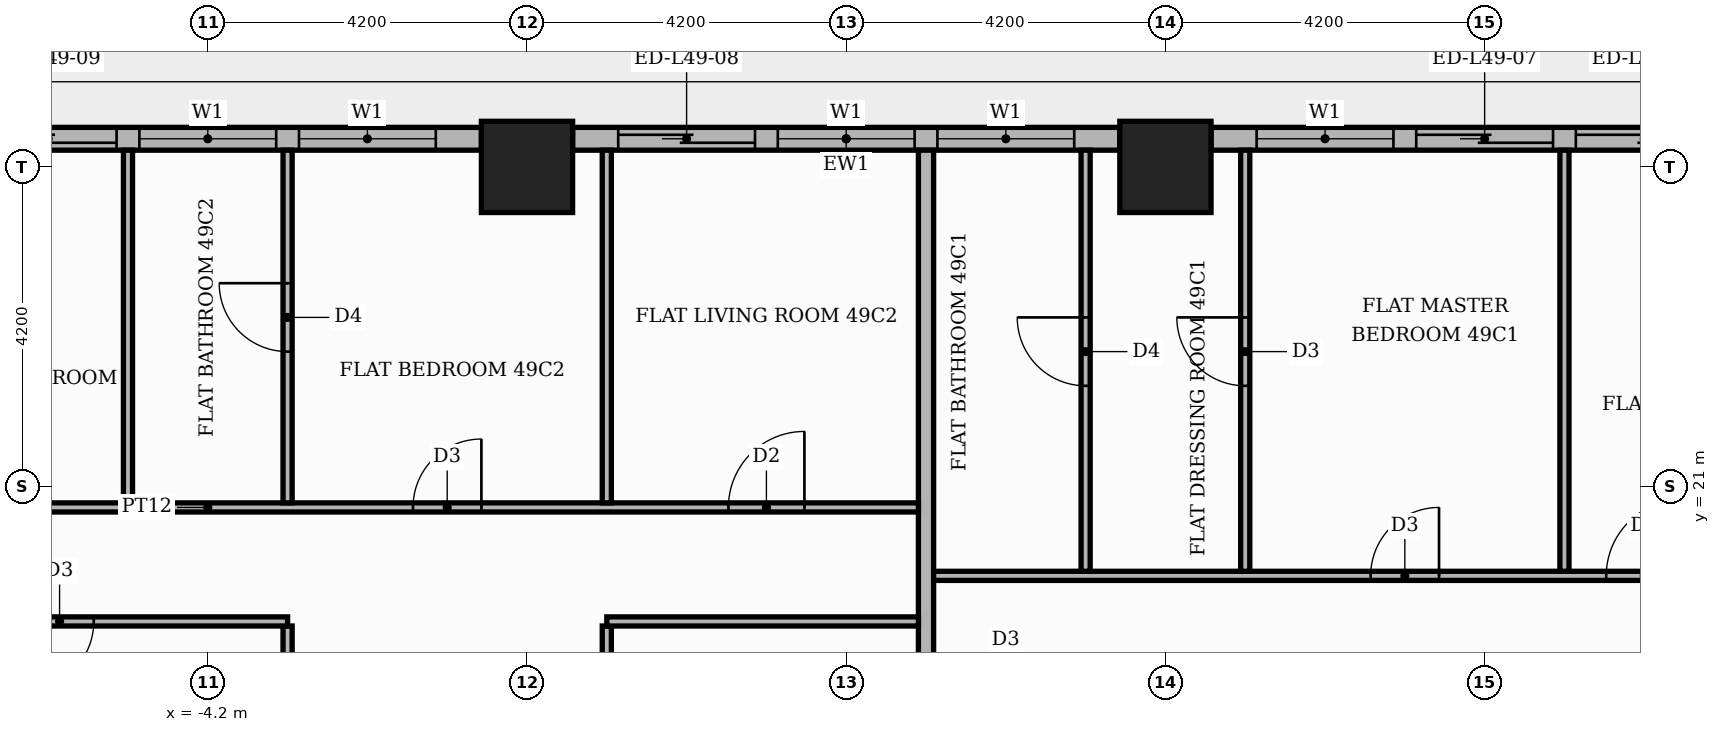
"""IFC4 building model, lengths in metres.
Left out: names, types, materials, properties, quantities, classifications, styles, units other than length and angle.
Written with IfcOpenShell. Run it as: python <this file> out.ifc"""

import sys

from ifc_helpers import new_model, si_unit, direction, frame, frame_2d, origin, origin_2d, place, context, subcontext, project, spatial, rectangle, extrude, element, fill, save


model = new_model("IFC4")
c1 = context("Model", 3, precision=1e-05, world=origin(), true_north=direction((0.0, 1.0)))
c2 = subcontext(c1, "Body", "Model", "MODEL_VIEW")
j1 = project(units=[si_unit("LENGTHUNIT", "METRE"), si_unit("PLANEANGLEUNIT", "RADIAN")], contexts=[c1])
p1 = place(None, origin())
s1 = spatial("IfcSite", under=j1, at=p1, CompositionType="ELEMENT")
p2 = place(p1, origin())
s2 = spatial("IfcBuilding", under=s1, at=p2, CompositionType="ELEMENT")
p3 = place(p2, frame((0.0, 0.0, 207.9)))
s3 = spatial("IfcBuildingStorey", under=s2, at=p3, CompositionType="ELEMENT", Elevation=207.9)
for number, where, z_axis, x_axis in (
    (1, (0.0, 25.2, 0.0), (0.0, 0.0, 1.0), (1.0, 0.0, 0.0)),
    (2, (8.4, 25.2, 0.0), (0.0, 0.0, 1.0), (1.0, 0.0, 0.0)),
):
    element("IfcColumn", number, at=place(p3, frame(where, z_axis=z_axis, x_axis=x_axis)), inside=s3, PredefinedType="COLUMN", context=c2, shape_type="SweptSolid", body=[
        extrude(rectangle(XDim=1.2, YDim=1.2, at=origin_2d()), origin(), (0.0, 0.0, 1.0), 3.9),
    ])
p4 = place(p3, frame((16.2, 25.57, 0.0), z_axis=(0.0, 0.0, 1.0), x_axis=(-1.0, 0.0, 0.0)))
e3 = element("IfcWall", 3, at=p4, inside=s3, PredefinedType="STANDARD", context=c2, shape_type="SweptSolid", body=[
    extrude(rectangle(XDim=7.2, YDim=0.3, at=frame_2d((3.6, 0.0))), origin(), (0.0, 0.0, 1.0), 3.48),
])
p5 = place(p4, frame((0.6, 0.0, 0.0)))
e4 = element("IfcOpeningElement", 4, at=p5, cuts=e3, PredefinedType="OPENING", context=c2, shape_type="SweptSolid", body=[
    extrude(rectangle(XDim=1.8, YDim=2.4, at=frame_2d((0.9, 1.2))), frame((0.0, 0.16, 0.0), z_axis=(0.0, -1.0, 0.0), x_axis=(1.0, 0.0, 0.0)), (0.0, 0.0, 1.0), 0.32),
])
p6 = place(p4, frame((2.7, 0.0, 0.0)))
e5 = element("IfcOpeningElement", 5, at=p6, cuts=e3, PredefinedType="OPENING", context=c2, shape_type="SweptSolid", body=[
    extrude(rectangle(XDim=1.8, YDim=2.4, at=frame_2d((0.9, 1.2))), frame((0.0, 0.16, 0.0), z_axis=(0.0, -1.0, 0.0), x_axis=(1.0, 0.0, 0.0)), (0.0, 0.0, 1.0), 0.32),
])
p7 = place(p4, frame((4.8, 0.0, 0.9)))
e6 = element("IfcOpeningElement", 6, at=p7, cuts=e3, PredefinedType="OPENING", context=c2, shape_type="SweptSolid", body=[
    extrude(rectangle(XDim=1.8, YDim=2.1, at=frame_2d((0.9, 1.05))), frame((0.0, 0.16, 0.0), z_axis=(0.0, -1.0, 0.0), x_axis=(1.0, 0.0, 0.0)), (0.0, 0.0, 1.0), 0.32),
])
p8 = place(p3, frame((7.8, 25.57, 0.0), z_axis=(0.0, 0.0, 1.0), x_axis=(-1.0, 0.0, 0.0)))
e7 = element("IfcWall", 7, at=p8, inside=s3, PredefinedType="STANDARD", context=c2, shape_type="SweptSolid", body=[
    extrude(rectangle(XDim=7.2, YDim=0.3, at=frame_2d((3.6, 0.0))), origin(), (0.0, 0.0, 1.0), 3.48),
])
p9 = place(p8, frame((0.6, 0.0, 0.9)))
e8 = element("IfcOpeningElement", 8, at=p9, cuts=e7, PredefinedType="OPENING", context=c2, shape_type="SweptSolid", body=[
    extrude(rectangle(XDim=1.8, YDim=2.1, at=frame_2d((0.9, 1.05))), frame((0.0, 0.16, 0.0), z_axis=(0.0, -1.0, 0.0), x_axis=(1.0, 0.0, 0.0)), (0.0, 0.0, 1.0), 0.32),
])
p10 = place(p8, frame((2.7, 0.0, 0.9)))
e9 = element("IfcOpeningElement", 9, at=p10, cuts=e7, PredefinedType="OPENING", context=c2, shape_type="SweptSolid", body=[
    extrude(rectangle(XDim=1.8, YDim=2.1, at=frame_2d((0.9, 1.05))), frame((0.0, 0.16, 0.0), z_axis=(0.0, -1.0, 0.0), x_axis=(1.0, 0.0, 0.0)), (0.0, 0.0, 1.0), 0.32),
])
p11 = place(p8, frame((4.8, 0.0, 0.0)))
e10 = element("IfcOpeningElement", 10, at=p11, cuts=e7, PredefinedType="OPENING", context=c2, shape_type="SweptSolid", body=[
    extrude(rectangle(XDim=1.8, YDim=2.4, at=frame_2d((0.9, 1.2))), frame((0.0, 0.16, 0.0), z_axis=(0.0, -1.0, 0.0), x_axis=(1.0, 0.0, 0.0)), (0.0, 0.0, 1.0), 0.32),
])
p12 = place(p3, frame((-0.6, 25.57, 0.0), z_axis=(0.0, 0.0, 1.0), x_axis=(-1.0, 0.0, 0.0)))
e11 = element("IfcWall", 11, at=p12, inside=s3, PredefinedType="STANDARD", context=c2, shape_type="SweptSolid", body=[
    extrude(rectangle(XDim=7.2, YDim=0.3, at=frame_2d((3.6, 0.0))), origin(), (0.0, 0.0, 1.0), 3.48),
])
p13 = place(p12, frame((0.6, 0.0, 0.9)))
e12 = element("IfcOpeningElement", 12, at=p13, cuts=e11, PredefinedType="OPENING", context=c2, shape_type="SweptSolid", body=[
    extrude(rectangle(XDim=1.8, YDim=2.1, at=frame_2d((0.9, 1.05))), frame((0.0, 0.16, 0.0), z_axis=(0.0, -1.0, 0.0), x_axis=(1.0, 0.0, 0.0)), (0.0, 0.0, 1.0), 0.32),
])
p14 = place(p12, frame((2.7, 0.0, 0.9)))
e13 = element("IfcOpeningElement", 13, at=p14, cuts=e11, PredefinedType="OPENING", context=c2, shape_type="SweptSolid", body=[
    extrude(rectangle(XDim=1.8, YDim=2.1, at=frame_2d((0.9, 1.05))), frame((0.0, 0.16, 0.0), z_axis=(0.0, -1.0, 0.0), x_axis=(1.0, 0.0, 0.0)), (0.0, 0.0, 1.0), 0.32),
])
p15 = place(p12, frame((4.8, 0.0, 0.0)))
e14 = element("IfcOpeningElement", 14, at=p15, cuts=e11, PredefinedType="OPENING", context=c2, shape_type="SweptSolid", body=[
    extrude(rectangle(XDim=1.8, YDim=2.4, at=frame_2d((0.9, 1.2))), frame((0.0, 0.16, 0.0), z_axis=(0.0, -1.0, 0.0), x_axis=(1.0, 0.0, 0.0)), (0.0, 0.0, 1.0), 0.32),
])
p16 = place(p3, frame((-3.15, 13.75, 0.0), z_axis=(0.0, 0.0, 1.0), x_axis=(0.0, 1.0, 0.0)))
e15 = element("IfcWall", 15, at=p16, inside=s3, PredefinedType="PARTITIONING", context=c2, shape_type="SweptSolid", body=[
    extrude(rectangle(XDim=5.41, YDim=0.12, at=frame_2d((2.705, 0.0))), origin(), (0.0, 0.0, 1.0), 3.48),
])
p17 = place(p3, frame((1.05, 13.75, 0.0), z_axis=(0.0, 0.0, 1.0), x_axis=(0.0, 1.0, 0.0)))
e16 = element("IfcWall", 16, at=p17, inside=s3, PredefinedType="PARTITIONING", context=c2, shape_type="SweptSolid", body=[
    extrude(rectangle(XDim=5.41, YDim=0.12, at=frame_2d((2.705, 0.0))), origin(), (0.0, 0.0, 1.0), 3.48),
])
p18 = place(p17, frame((2.235, 0.0, 0.0)))
e17 = element("IfcOpeningElement", 17, at=p18, cuts=e16, PredefinedType="OPENING", context=c2, shape_type="SweptSolid", body=[
    extrude(rectangle(XDim=0.9, YDim=2.1, at=frame_2d((0.45, 1.05))), frame((0.0, 0.07, 0.0), z_axis=(0.0, -1.0, 0.0), x_axis=(1.0, 0.0, 0.0)), (0.0, 0.0, 1.0), 0.14),
])
p19 = place(p3, frame((5.25, 13.75, 0.0), z_axis=(0.0, 0.0, 1.0), x_axis=(0.0, 1.0, 0.0)))
e18 = element("IfcWall", 18, at=p19, inside=s3, PredefinedType="PARTITIONING", context=c2, shape_type="SweptSolid", body=[
    extrude(rectangle(XDim=11.67, YDim=0.2, at=frame_2d((5.835, 0.0))), origin(), (0.0, 0.0, 1.0), 3.48),
])
p20 = place(p3, frame((-13.55, 19.22, 0.0), z_axis=(0.0, 0.0, 1.0), x_axis=(1.0, 0.0, 0.0)))
e19 = element("IfcWall", 19, at=p20, inside=s3, PredefinedType="PARTITIONING", context=c2, shape_type="SweptSolid", body=[
    extrude(rectangle(XDim=10.4, YDim=0.12, at=frame_2d((5.2, 0.0))), origin(), (0.0, 0.0, 1.0), 3.48),
])
p21 = place(p20, frame((6.95, 0.0, 0.0)))
e20 = element("IfcOpeningElement", 20, at=p21, cuts=e19, PredefinedType="OPENING", context=c2, shape_type="SweptSolid", body=[
    extrude(rectangle(XDim=0.9, YDim=2.1, at=frame_2d((0.45, 1.05))), frame((0.0, 0.07, 0.0), z_axis=(0.0, -1.0, 0.0), x_axis=(1.0, 0.0, 0.0)), (0.0, 0.0, 1.0), 0.14),
])
p22 = place(p20, frame((2.75, 0.0, 0.0)))
e21 = element("IfcOpeningElement", 21, at=p22, cuts=e19, PredefinedType="OPENING", context=c2, shape_type="SweptSolid", body=[
    extrude(rectangle(XDim=0.9, YDim=2.1, at=frame_2d((0.45, 1.05))), frame((0.0, 0.07, 0.0), z_axis=(0.0, -1.0, 0.0), x_axis=(1.0, 0.0, 0.0)), (0.0, 0.0, 1.0), 0.14),
])
p23 = place(p20, frame((0.5, 0.0, 0.0)))
e22 = element("IfcOpeningElement", 22, at=p23, cuts=e19, PredefinedType="OPENING", context=c2, shape_type="SweptSolid", body=[
    extrude(rectangle(XDim=0.9, YDim=2.1, at=frame_2d((0.45, 1.05))), frame((0.0, 0.07, 0.0), z_axis=(0.0, -1.0, 0.0), x_axis=(1.0, 0.0, 0.0)), (0.0, 0.0, 1.0), 0.14),
])
p24 = place(p3, frame((1.05, 19.22, 0.0), z_axis=(0.0, 0.0, 1.0), x_axis=(1.0, 0.0, 0.0)))
e23 = element("IfcWall", 23, at=p24, inside=s3, PredefinedType="PARTITIONING", context=c2, shape_type="SweptSolid", body=[
    extrude(rectangle(XDim=4.1, YDim=0.12, at=frame_2d((2.05, 0.0))), origin(), (0.0, 0.0, 1.0), 3.48),
])
p25 = place(p3, frame((5.35, 19.82, 0.0), z_axis=(0.0, 0.0, 1.0), x_axis=(1.0, 0.0, 0.0)))
e24 = element("IfcWall", 24, at=p25, inside=s3, PredefinedType="PARTITIONING", context=c2, shape_type="SweptSolid", body=[
    extrude(rectangle(XDim=12.25, YDim=0.12, at=frame_2d((6.125, 0.0))), origin(), (0.0, 0.0, 1.0), 3.48),
])
p26 = place(p25, frame((8.85, 0.0, 0.0)))
e25 = element("IfcOpeningElement", 25, at=p26, cuts=e24, PredefinedType="OPENING", context=c2, shape_type="SweptSolid", body=[
    extrude(rectangle(XDim=1.0, YDim=2.1, at=frame_2d((0.5, 1.05))), frame((0.0, 0.07, 0.0), z_axis=(0.0, -1.0, 0.0), x_axis=(1.0, 0.0, 0.0)), (0.0, 0.0, 1.0), 0.14),
])
p27 = place(p25, frame((5.75, 0.0, 0.0)))
e26 = element("IfcOpeningElement", 26, at=p27, cuts=e24, PredefinedType="OPENING", context=c2, shape_type="SweptSolid", body=[
    extrude(rectangle(XDim=0.9, YDim=2.1, at=frame_2d((0.45, 1.05))), frame((0.0, 0.07, 0.0), z_axis=(0.0, -1.0, 0.0), x_axis=(1.0, 0.0, 0.0)), (0.0, 0.0, 1.0), 0.14),
])
p28 = place(p3, frame((7.35, 19.88, 0.0), z_axis=(0.0, 0.0, 1.0), x_axis=(0.0, 1.0, 0.0)))
e27 = element("IfcWall", 27, at=p28, inside=s3, PredefinedType="PARTITIONING", context=c2, shape_type="SweptSolid", body=[
    extrude(rectangle(XDim=5.54, YDim=0.12, at=frame_2d((2.77, 0.0))), origin(), (0.0, 0.0, 1.0), 3.48),
])
p29 = place(p28, frame((2.44, 0.0, 0.0)))
e28 = element("IfcOpeningElement", 28, at=p29, cuts=e27, PredefinedType="OPENING", context=c2, shape_type="SweptSolid", body=[
    extrude(rectangle(XDim=0.9, YDim=2.1, at=frame_2d((0.45, 1.05))), frame((0.0, 0.07, 0.0), z_axis=(0.0, -1.0, 0.0), x_axis=(1.0, 0.0, 0.0)), (0.0, 0.0, 1.0), 0.14),
])
p30 = place(p3, frame((9.45, 19.88, 0.0), z_axis=(0.0, 0.0, 1.0), x_axis=(0.0, 1.0, 0.0)))
e29 = element("IfcWall", 29, at=p30, inside=s3, PredefinedType="PARTITIONING", context=c2, shape_type="SweptSolid", body=[
    extrude(rectangle(XDim=5.54, YDim=0.12, at=frame_2d((2.77, 0.0))), origin(), (0.0, 0.0, 1.0), 3.48),
])
p31 = place(p30, frame((2.44, 0.0, 0.0)))
e30 = element("IfcOpeningElement", 30, at=p31, cuts=e29, PredefinedType="OPENING", context=c2, shape_type="SweptSolid", body=[
    extrude(rectangle(XDim=0.9, YDim=2.1, at=frame_2d((0.45, 1.05))), frame((0.0, 0.07, 0.0), z_axis=(0.0, -1.0, 0.0), x_axis=(1.0, 0.0, 0.0)), (0.0, 0.0, 1.0), 0.14),
])
p32 = place(p3, frame((13.65, 19.88, 0.0), z_axis=(0.0, 0.0, 1.0), x_axis=(0.0, 1.0, 0.0)))
e31 = element("IfcWall", 31, at=p32, inside=s3, PredefinedType="PARTITIONING", context=c2, shape_type="SweptSolid", body=[
    extrude(rectangle(XDim=5.54, YDim=0.12, at=frame_2d((2.77, 0.0))), origin(), (0.0, 0.0, 1.0), 3.48),
])
p33 = place(p3, frame((-13.55, 20.72, 0.0), z_axis=(0.0, 0.0, 1.0), x_axis=(1.0, 0.0, 0.0)))
e32 = element("IfcWall", 32, at=p33, inside=s3, PredefinedType="PARTITIONING", context=c2, shape_type="SweptSolid", body=[
    extrude(rectangle(XDim=18.7, YDim=0.12, at=frame_2d((9.35, 0.0))), origin(), (0.0, 0.0, 1.0), 3.48),
])
p34 = place(p33, frame((16.2, 0.0, 0.0)))
e33 = element("IfcOpeningElement", 33, at=p34, cuts=e32, PredefinedType="OPENING", context=c2, shape_type="SweptSolid", body=[
    extrude(rectangle(XDim=1.0, YDim=2.1, at=frame_2d((0.5, 1.05))), frame((0.0, 0.07, 0.0), z_axis=(0.0, -1.0, 0.0), x_axis=(1.0, 0.0, 0.0)), (0.0, 0.0, 1.0), 0.14),
])
p35 = place(p33, frame((12.05, 0.0, 0.0)))
e34 = element("IfcOpeningElement", 34, at=p35, cuts=e32, PredefinedType="OPENING", context=c2, shape_type="SweptSolid", body=[
    extrude(rectangle(XDim=0.9, YDim=2.1, at=frame_2d((0.45, 1.05))), frame((0.0, 0.07, 0.0), z_axis=(0.0, -1.0, 0.0), x_axis=(1.0, 0.0, 0.0)), (0.0, 0.0, 1.0), 0.14),
])
p36 = place(p33, frame((5.75, 0.0, 0.0)))
e35 = element("IfcOpeningElement", 35, at=p36, cuts=e32, PredefinedType="OPENING", context=c2, shape_type="SweptSolid", body=[
    extrude(rectangle(XDim=0.9, YDim=2.1, at=frame_2d((0.45, 1.05))), frame((0.0, 0.07, 0.0), z_axis=(0.0, -1.0, 0.0), x_axis=(1.0, 0.0, 0.0)), (0.0, 0.0, 1.0), 0.14),
])
p37 = place(p3, frame((-5.25, 20.78, 0.0), z_axis=(0.0, 0.0, 1.0), x_axis=(0.0, 1.0, 0.0)))
e36 = element("IfcWall", 36, at=p37, inside=s3, PredefinedType="PARTITIONING", context=c2, shape_type="SweptSolid", body=[
    extrude(rectangle(XDim=4.64, YDim=0.12, at=frame_2d((2.32, 0.0))), origin(), (0.0, 0.0, 1.0), 3.48),
])
p38 = place(p3, frame((-3.15, 20.78, 0.0), z_axis=(0.0, 0.0, 1.0), x_axis=(0.0, 1.0, 0.0)))
e37 = element("IfcWall", 37, at=p38, inside=s3, PredefinedType="PARTITIONING", context=c2, shape_type="SweptSolid", body=[
    extrude(rectangle(XDim=4.64, YDim=0.12, at=frame_2d((2.32, 0.0))), origin(), (0.0, 0.0, 1.0), 3.48),
])
p39 = place(p38, frame((1.99, 0.0, 0.0)))
e38 = element("IfcOpeningElement", 38, at=p39, cuts=e37, PredefinedType="OPENING", context=c2, shape_type="SweptSolid", body=[
    extrude(rectangle(XDim=0.9, YDim=2.1, at=frame_2d((0.45, 1.05))), frame((0.0, 0.07, 0.0), z_axis=(0.0, -1.0, 0.0), x_axis=(1.0, 0.0, 0.0)), (0.0, 0.0, 1.0), 0.14),
])
p40 = place(p3, frame((1.05, 20.78, 0.0), z_axis=(0.0, 0.0, 1.0), x_axis=(0.0, 1.0, 0.0)))
e39 = element("IfcWall", 39, at=p40, inside=s3, PredefinedType="PARTITIONING", context=c2, shape_type="SweptSolid", body=[
    extrude(rectangle(XDim=4.64, YDim=0.12, at=frame_2d((2.32, 0.0))), origin(), (0.0, 0.0, 1.0), 3.48),
])
p41 = place(p5, origin())
e40 = element("IfcDoor", 40, at=p41, inside=s3, OperationType="SLIDING_TO_LEFT", PredefinedType="DOOR", context=c2, shape_type="SweptSolid", body=[
    extrude(rectangle(XDim=1.8, YDim=2.4, at=frame_2d((0.9, 1.2))), frame((0.0, 0.025, 0.0), z_axis=(0.0, -1.0, 0.0), x_axis=(1.0, 0.0, 0.0)), (0.0, 0.0, 1.0), 0.05),
])
fill(e4, e40)
p42 = place(p6, origin())
e41 = element("IfcDoor", 41, at=p42, inside=s3, OperationType="SLIDING_TO_RIGHT", PredefinedType="DOOR", context=c2, shape_type="SweptSolid", body=[
    extrude(rectangle(XDim=1.8, YDim=2.4, at=frame_2d((0.9, 1.2))), frame((0.0, 0.025, 0.0), z_axis=(0.0, -1.0, 0.0), x_axis=(1.0, 0.0, 0.0)), (0.0, 0.0, 1.0), 0.05),
])
fill(e5, e41)
p43 = place(p7, origin())
e42 = element("IfcWindow", 42, at=p43, inside=s3, PartitioningType="SINGLE_PANEL", PredefinedType="WINDOW", context=c2, shape_type="SweptSolid", body=[
    extrude(rectangle(XDim=1.8, YDim=2.1, at=frame_2d((0.9, 1.05))), frame((0.0, 0.03, 0.0), z_axis=(0.0, -1.0, 0.0), x_axis=(1.0, 0.0, 0.0)), (0.0, 0.0, 1.0), 0.06),
])
fill(e6, e42)
p44 = place(p9, origin())
e43 = element("IfcWindow", 43, at=p44, inside=s3, PartitioningType="SINGLE_PANEL", PredefinedType="WINDOW", context=c2, shape_type="SweptSolid", body=[
    extrude(rectangle(XDim=1.8, YDim=2.1, at=frame_2d((0.9, 1.05))), frame((0.0, 0.03, 0.0), z_axis=(0.0, -1.0, 0.0), x_axis=(1.0, 0.0, 0.0)), (0.0, 0.0, 1.0), 0.06),
])
fill(e8, e43)
p45 = place(p10, origin())
e44 = element("IfcWindow", 44, at=p45, inside=s3, PartitioningType="SINGLE_PANEL", PredefinedType="WINDOW", context=c2, shape_type="SweptSolid", body=[
    extrude(rectangle(XDim=1.8, YDim=2.1, at=frame_2d((0.9, 1.05))), frame((0.0, 0.03, 0.0), z_axis=(0.0, -1.0, 0.0), x_axis=(1.0, 0.0, 0.0)), (0.0, 0.0, 1.0), 0.06),
])
fill(e9, e44)
p46 = place(p11, origin())
e45 = element("IfcDoor", 45, at=p46, inside=s3, OperationType="SLIDING_TO_RIGHT", PredefinedType="DOOR", context=c2, shape_type="SweptSolid", body=[
    extrude(rectangle(XDim=1.8, YDim=2.4, at=frame_2d((0.9, 1.2))), frame((0.0, 0.025, 0.0), z_axis=(0.0, -1.0, 0.0), x_axis=(1.0, 0.0, 0.0)), (0.0, 0.0, 1.0), 0.05),
])
fill(e10, e45)
p47 = place(p13, origin())
e46 = element("IfcWindow", 46, at=p47, inside=s3, PartitioningType="SINGLE_PANEL", PredefinedType="WINDOW", context=c2, shape_type="SweptSolid", body=[
    extrude(rectangle(XDim=1.8, YDim=2.1, at=frame_2d((0.9, 1.05))), frame((0.0, 0.03, 0.0), z_axis=(0.0, -1.0, 0.0), x_axis=(1.0, 0.0, 0.0)), (0.0, 0.0, 1.0), 0.06),
])
fill(e12, e46)
p48 = place(p14, origin())
e47 = element("IfcWindow", 47, at=p48, inside=s3, PartitioningType="SINGLE_PANEL", PredefinedType="WINDOW", context=c2, shape_type="SweptSolid", body=[
    extrude(rectangle(XDim=1.8, YDim=2.1, at=frame_2d((0.9, 1.05))), frame((0.0, 0.03, 0.0), z_axis=(0.0, -1.0, 0.0), x_axis=(1.0, 0.0, 0.0)), (0.0, 0.0, 1.0), 0.06),
])
fill(e13, e47)
p49 = place(p15, origin())
e48 = element("IfcDoor", 48, at=p49, inside=s3, OperationType="SLIDING_TO_RIGHT", PredefinedType="DOOR", context=c2, shape_type="SweptSolid", body=[
    extrude(rectangle(XDim=1.8, YDim=2.4, at=frame_2d((0.9, 1.2))), frame((0.0, 0.025, 0.0), z_axis=(0.0, -1.0, 0.0), x_axis=(1.0, 0.0, 0.0)), (0.0, 0.0, 1.0), 0.05),
])
fill(e14, e48)
p50 = place(p26, origin())
e49 = element("IfcDoor", 49, at=p50, inside=s3, OperationType="SINGLE_SWING_RIGHT", PredefinedType="DOOR", context=c2, shape_type="SweptSolid", body=[
    extrude(rectangle(XDim=1.0, YDim=2.1, at=frame_2d((0.5, 1.05))), frame((0.0, 0.025, 0.0), z_axis=(0.0, -1.0, 0.0), x_axis=(1.0, 0.0, 0.0)), (0.0, 0.0, 1.0), 0.05),
])
fill(e25, e49)
p51 = place(p27, origin())
e50 = element("IfcDoor", 50, at=p51, inside=s3, OperationType="SINGLE_SWING_RIGHT", PredefinedType="DOOR", context=c2, shape_type="SweptSolid", body=[
    extrude(rectangle(XDim=0.9, YDim=2.1, at=frame_2d((0.45, 1.05))), frame((0.0, 0.025, 0.0), z_axis=(0.0, -1.0, 0.0), x_axis=(1.0, 0.0, 0.0)), (0.0, 0.0, 1.0), 0.05),
])
fill(e26, e50)
p52 = place(p31, origin())
e51 = element("IfcDoor", 51, at=p52, inside=s3, OperationType="SINGLE_SWING_RIGHT", PredefinedType="DOOR", context=c2, shape_type="SweptSolid", body=[
    extrude(rectangle(XDim=0.9, YDim=2.1, at=frame_2d((0.45, 1.05))), frame((0.0, 0.025, 0.0), z_axis=(0.0, -1.0, 0.0), x_axis=(1.0, 0.0, 0.0)), (0.0, 0.0, 1.0), 0.05),
])
fill(e30, e51)
p53 = place(p29, origin())
e52 = element("IfcDoor", 52, at=p53, inside=s3, OperationType="SINGLE_SWING_RIGHT", PredefinedType="DOOR", context=c2, shape_type="SweptSolid", body=[
    extrude(rectangle(XDim=0.9, YDim=2.1, at=frame_2d((0.45, 1.05))), frame((0.0, 0.025, 0.0), z_axis=(0.0, -1.0, 0.0), x_axis=(1.0, 0.0, 0.0)), (0.0, 0.0, 1.0), 0.05),
])
fill(e28, e52)
p54 = place(p21, frame((0.9, 0.0, 0.0), z_axis=(0.0, 0.0, 1.0), x_axis=(-1.0, 0.0, 0.0)))
e53 = element("IfcDoor", 53, at=p54, inside=s3, OperationType="SINGLE_SWING_LEFT", PredefinedType="DOOR", context=c2, shape_type="SweptSolid", body=[
    extrude(rectangle(XDim=0.9, YDim=2.1, at=frame_2d((0.45, 1.05))), frame((0.0, 0.025, 0.0), z_axis=(0.0, -1.0, 0.0), x_axis=(1.0, 0.0, 0.0)), (0.0, 0.0, 1.0), 0.05),
])
fill(e20, e53)
p55 = place(p34, origin())
e54 = element("IfcDoor", 54, at=p55, inside=s3, OperationType="SINGLE_SWING_RIGHT", PredefinedType="DOOR", context=c2, shape_type="SweptSolid", body=[
    extrude(rectangle(XDim=1.0, YDim=2.1, at=frame_2d((0.5, 1.05))), frame((0.0, 0.025, 0.0), z_axis=(0.0, -1.0, 0.0), x_axis=(1.0, 0.0, 0.0)), (0.0, 0.0, 1.0), 0.05),
])
fill(e33, e54)
p56 = place(p35, origin())
e55 = element("IfcDoor", 55, at=p56, inside=s3, OperationType="SINGLE_SWING_RIGHT", PredefinedType="DOOR", context=c2, shape_type="SweptSolid", body=[
    extrude(rectangle(XDim=0.9, YDim=2.1, at=frame_2d((0.45, 1.05))), frame((0.0, 0.025, 0.0), z_axis=(0.0, -1.0, 0.0), x_axis=(1.0, 0.0, 0.0)), (0.0, 0.0, 1.0), 0.05),
])
fill(e34, e55)
p57 = place(p39, origin())
e56 = element("IfcDoor", 56, at=p57, inside=s3, OperationType="SINGLE_SWING_RIGHT", PredefinedType="DOOR", context=c2, shape_type="SweptSolid", body=[
    extrude(rectangle(XDim=0.9, YDim=2.1, at=frame_2d((0.45, 1.05))), frame((0.0, 0.025, 0.0), z_axis=(0.0, -1.0, 0.0), x_axis=(1.0, 0.0, 0.0)), (0.0, 0.0, 1.0), 0.05),
])
fill(e38, e56)
save(model, sys.argv[1])
